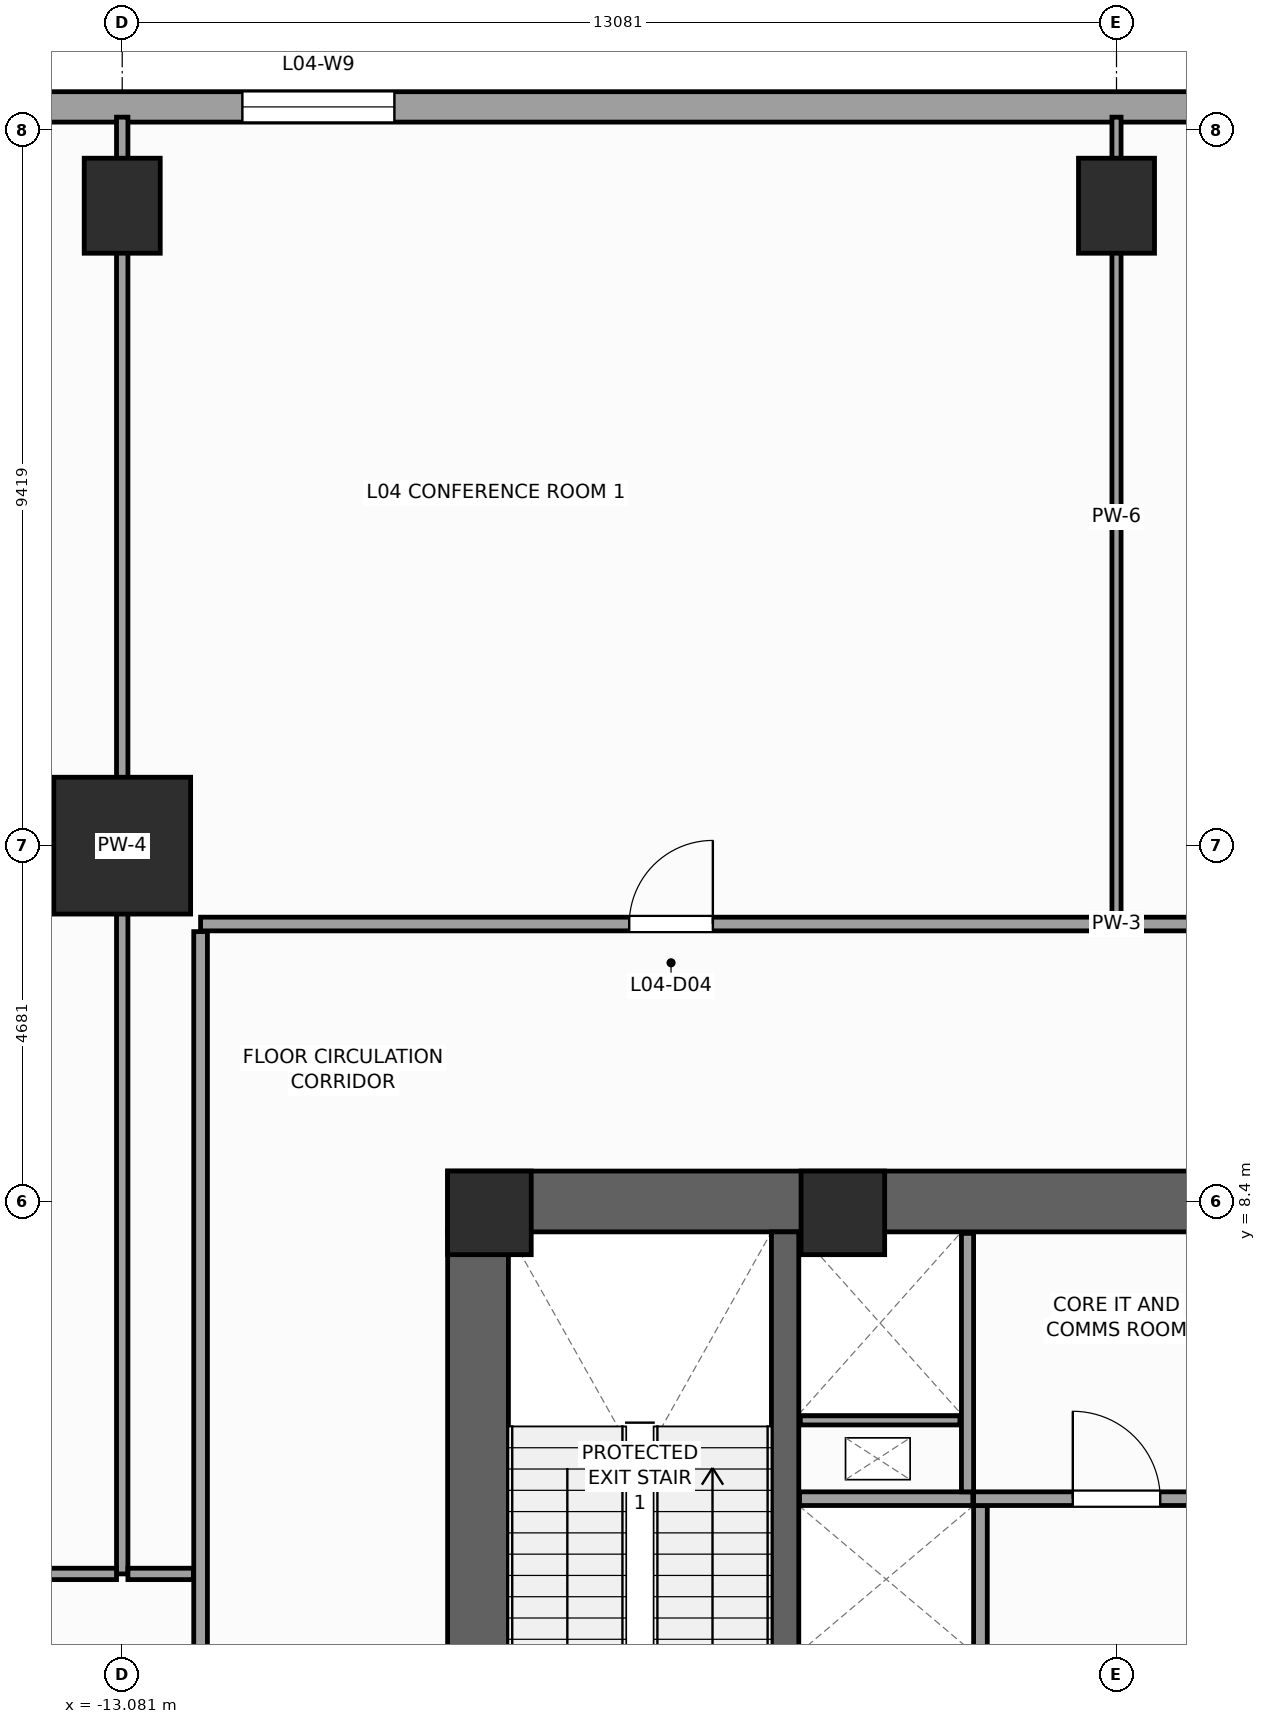
"""IFC4 building model, lengths in metres.
Left out: names, types, materials, properties, quantities, classifications, styles, units other than length and angle.
Written with IfcOpenShell. Run it as: python <this file> out.ifc"""

import sys

from ifc_helpers import new_model, si_unit, direction, frame, frame_2d, origin, origin_2d, place, context, subcontext, project, spatial, rectangle, extrude, source, transform, mapped, element, fill, save


model = new_model("IFC4")
c1 = context("Model", 3, precision=1e-05, world=origin(), true_north=direction((0.0, 1.0)))
c2 = subcontext(c1, "Body", "Model", "MODEL_VIEW")
j1 = project(units=[si_unit("LENGTHUNIT", "METRE"), si_unit("PLANEANGLEUNIT", "RADIAN")], contexts=[c1])
p1 = place(None, origin())
s1 = spatial("IfcSite", under=j1, at=p1, CompositionType="ELEMENT")
p2 = place(p1, origin())
s2 = spatial("IfcBuilding", under=s1, at=p2, CompositionType="ELEMENT")
p3 = place(p2, frame((0.0, 0.0, 21.0)))
s3 = spatial("IfcBuildingStorey", under=s2, at=p3, CompositionType="ELEMENT", Elevation=21.0)
p4 = place(p3, frame((-8.8, 8.4, 0.0), z_axis=(0.0, 0.0, 1.0), x_axis=(1.0, 0.0, 0.0)))
e1 = element("IfcWall", 1, at=p4, inside=s3, PredefinedType="SHEAR", context=c2, shape_type="SweptSolid", body=[
    extrude(rectangle(XDim=17.6, YDim=0.8, at=frame_2d((8.8, 0.0))), origin(), (0.0, 0.0, 1.0), 5.0),
])
p5 = place(p3, frame((-8.4, -8.0, 0.0), z_axis=(0.0, 0.0, 1.0), x_axis=(0.0, 1.0, 0.0)))
e2 = element("IfcWall", 2, at=p5, inside=s3, PredefinedType="SHEAR", context=c2, shape_type="SweptSolid", body=[
    extrude(rectangle(XDim=16.0, YDim=0.8, at=frame_2d((8.0, 0.0))), origin(), (0.0, 0.0, 1.0), 5.0),
])
p6 = place(p5, frame((4.69, 0.0, 0.0)))
e3 = element("IfcOpeningElement", 3, at=p6, cuts=e2, PredefinedType="OPENING", context=c2, shape_type="SweptSolid", body=[
    extrude(rectangle(XDim=1.3, YDim=2.2, at=frame_2d((0.65, 1.1))), frame((0.0, 0.41, 0.0), z_axis=(0.0, -1.0, 0.0), x_axis=(1.0, 0.0, 0.0)), (0.0, 0.0, 1.0), 0.82),
])
p7 = place(p3, frame((-4.36, -8.0, 0.0), z_axis=(0.0, 0.0, 1.0), x_axis=(0.0, 1.0, 0.0)))
e4 = element("IfcWall", 4, at=p7, inside=s3, PredefinedType="SHEAR", context=c2, shape_type="SweptSolid", body=[
    extrude(rectangle(XDim=16.0, YDim=0.36, at=frame_2d((8.0, 0.0))), origin(), (0.0, 0.0, 1.0), 5.0),
])
m1 = source(origin(), c2, "Body", "SweptSolid", [
    extrude(rectangle(XDim=1.1, YDim=1.1, at=origin_2d()), origin(), (0.0, 0.0, 1.0), 5.0),
])
for number, where, z_axis, x_axis in (
    (5, (-8.25, 8.25, 0.0), (0.0, 0.0, 1.0), (1.0, 0.0, 0.0)),
    (6, (-3.6, 8.25, 0.0), (0.0, 0.0, 1.0), (1.0, 0.0, 0.0)),
):
    element("IfcColumn", number, at=place(p3, frame(where, z_axis=z_axis, x_axis=x_axis)), inside=s3, PredefinedType="PILASTER", context=c2, shape_type="MappedRepresentation", body=[
        mapped(m1, transform((0.0, 0.0, 0.0), scale=1.0)),
    ])
m2 = source(origin(), c2, "Body", "SweptSolid", [
    extrude(rectangle(XDim=1.8, YDim=1.8, at=origin_2d()), origin(), (0.0, 0.0, 1.0), 5.0),
])
p8 = place(p3, frame((-13.081, 13.081, 0.0), z_axis=(0.0, 0.0, 1.0), x_axis=(1.0, 0.0, 0.0)))
e7 = element("IfcColumn", 7, at=p8, inside=s3, PredefinedType="COLUMN", context=c2, shape_type="MappedRepresentation", body=[
    mapped(m2, transform((0.0, 0.0, 0.0), scale=1.0)),
])
m3 = source(origin(), c2, "Body", "SweptSolid", [
    extrude(rectangle(XDim=1.0, YDim=1.25, at=origin_2d()), origin(), (0.0, 0.0, 1.0), 5.0),
])
for number, where, z_axis, x_axis in (
    (8, (-13.081, 21.5, 0.0), (0.0, 0.0, 1.0), (1.0, 0.0, 0.0)),
    (9, (0.0, 21.5, 0.0), (0.0, 0.0, 1.0), (1.0, 0.0, 0.0)),
):
    element("IfcColumn", number, at=place(p3, frame(where, z_axis=z_axis, x_axis=x_axis)), inside=s3, PredefinedType="COLUMN", context=c2, shape_type="MappedRepresentation", body=[
        mapped(m3, transform((0.0, 0.0, 0.0), scale=1.0)),
    ])
p9 = place(p3, frame((-31.0, 22.8, 0.0), z_axis=(0.0, 0.0, 1.0), x_axis=(1.0, 0.0, 0.0)))
e10 = element("IfcWall", 10, at=p9, inside=s3, PredefinedType="STANDARD", context=c2, shape_type="SweptSolid", body=[
    extrude(rectangle(XDim=32.5, YDim=0.4, at=frame_2d((16.25, 0.0))), origin(), (0.0, 0.0, 1.0), 4.72),
])
p10 = place(p9, frame((9.0, 0.0, 0.65)))
e11 = element("IfcOpeningElement", 11, at=p10, cuts=e10, PredefinedType="OPENING", context=c2, shape_type="SweptSolid", body=[
    extrude(rectangle(XDim=2.0, YDim=1.45, at=frame_2d((1.0, 0.725))), frame((0.0, 0.21, 0.0), z_axis=(0.0, -1.0, 0.0), x_axis=(1.0, 0.0, 0.0)), (0.0, 0.0, 1.0), 0.42),
])
p11 = place(p9, frame((14.0, 0.0, 0.65)))
e12 = element("IfcOpeningElement", 12, at=p11, cuts=e10, PredefinedType="OPENING", context=c2, shape_type="SweptSolid", body=[
    extrude(rectangle(XDim=2.0, YDim=1.45, at=frame_2d((1.0, 0.725))), frame((0.0, 0.21, 0.0), z_axis=(0.0, -1.0, 0.0), x_axis=(1.0, 0.0, 0.0)), (0.0, 0.0, 1.0), 0.42),
])
p12 = place(p9, frame((19.5, 0.0, 0.65)))
e13 = element("IfcOpeningElement", 13, at=p12, cuts=e10, PredefinedType="OPENING", context=c2, shape_type="SweptSolid", body=[
    extrude(rectangle(XDim=2.0, YDim=1.45, at=frame_2d((1.0, 0.725))), frame((0.0, 0.21, 0.0), z_axis=(0.0, -1.0, 0.0), x_axis=(1.0, 0.0, 0.0)), (0.0, 0.0, 1.0), 0.42),
])
p13 = place(p3, frame((-1.79, -7.98, 0.0), z_axis=(0.0, 0.0, 1.0), x_axis=(0.0, 1.0, 0.0)))
e14 = element("IfcWall", 14, at=p13, inside=s3, PredefinedType="PARTITIONING", context=c2, shape_type="SweptSolid", body=[
    extrude(rectangle(XDim=12.38, YDim=0.18, at=frame_2d((6.19, 0.0))), origin(), (0.0, 0.0, 1.0), 4.72),
])
p14 = place(p13, frame((0.4, 0.0, 0.0)))
e15 = element("IfcOpeningElement", 15, at=p14, cuts=e14, PredefinedType="OPENING", context=c2, shape_type="SweptSolid", body=[
    extrude(rectangle(XDim=1.1, YDim=2.2, at=frame_2d((0.55, 1.1))), frame((0.0, 0.1, 0.0), z_axis=(0.0, -1.0, 0.0), x_axis=(1.0, 0.0, 0.0)), (0.0, 0.0, 1.0), 0.2),
])
p15 = place(p13, frame((2.46, 0.0, 0.0)))
e16 = element("IfcOpeningElement", 16, at=p15, cuts=e14, PredefinedType="OPENING", context=c2, shape_type="SweptSolid", body=[
    extrude(rectangle(XDim=1.1, YDim=2.2, at=frame_2d((0.55, 1.1))), frame((0.0, 0.1, 0.0), z_axis=(0.0, -1.0, 0.0), x_axis=(1.0, 0.0, 0.0)), (0.0, 0.0, 1.0), 0.2),
])
p16 = place(p3, frame((-1.88, 4.49, 0.0), z_axis=(0.0, 0.0, 1.0), x_axis=(1.0, 0.0, 0.0)))
e17 = element("IfcWall", 17, at=p16, inside=s3, PredefinedType="PARTITIONING", context=c2, shape_type="SweptSolid", body=[
    extrude(rectangle(XDim=3.76, YDim=0.18, at=frame_2d((1.88, 0.0))), origin(), (0.0, 0.0, 1.0), 4.72),
])
p17 = place(p16, frame((1.305, 0.0, 0.0)))
e18 = element("IfcOpeningElement", 18, at=p17, cuts=e17, PredefinedType="OPENING", context=c2, shape_type="SweptSolid", body=[
    extrude(rectangle(XDim=1.15, YDim=2.25, at=frame_2d((0.575, 1.125))), frame((0.0, 0.1, 0.0), z_axis=(0.0, -1.0, 0.0), x_axis=(1.0, 0.0, 0.0)), (0.0, 0.0, 1.0), 0.2),
])
p18 = place(p3, frame((-4.17, 4.49, 0.0), z_axis=(0.0, 0.0, 1.0), x_axis=(1.0, 0.0, 0.0)))
e19 = element("IfcWall", 19, at=p18, inside=s3, PredefinedType="PARTITIONING", context=c2, shape_type="SweptSolid", body=[
    extrude(rectangle(XDim=2.28, YDim=0.18, at=frame_2d((1.14, 0.0))), origin(), (0.0, 0.0, 1.0), 4.72),
])
p19 = place(p3, frame((-1.96, 4.58, 0.0), z_axis=(0.0, 0.0, 1.0), x_axis=(0.0, 1.0, 0.0)))
e20 = element("IfcWall", 20, at=p19, inside=s3, PredefinedType="PARTITIONING", context=c2, shape_type="SweptSolid", body=[
    extrude(rectangle(XDim=3.4, YDim=0.16, at=frame_2d((1.7, 0.0))), origin(), (0.0, 0.0, 1.0), 4.72),
])
p20 = place(p3, frame((-4.16, 5.52, 0.0), z_axis=(0.0, 0.0, 1.0), x_axis=(1.0, 0.0, 0.0)))
e21 = element("IfcWall", 21, at=p20, inside=s3, PredefinedType="PARTITIONING", context=c2, shape_type="SweptSolid", body=[
    extrude(rectangle(XDim=2.1, YDim=0.12, at=frame_2d((1.05, 0.0))), origin(), (0.0, 0.0, 1.0), 4.72),
])
p21 = place(p3, frame((-12.05, 12.05, 0.0), z_axis=(0.0, 0.0, 1.0), x_axis=(1.0, 0.0, 0.0)))
e22 = element("IfcWall", 22, at=p21, inside=s3, PredefinedType="PARTITIONING", context=c2, shape_type="SweptSolid", body=[
    extrude(rectangle(XDim=24.1, YDim=0.18, at=frame_2d((12.05, 0.0))), origin(), (0.0, 0.0, 1.0), 4.72),
])
p22 = place(p21, frame((5.639, 0.0, 0.0)))
e23 = element("IfcOpeningElement", 23, at=p22, cuts=e22, PredefinedType="OPENING", context=c2, shape_type="SweptSolid", body=[
    extrude(rectangle(XDim=1.1, YDim=2.2, at=frame_2d((0.55, 1.1))), frame((0.0, 0.1, 0.0), z_axis=(0.0, -1.0, 0.0), x_axis=(1.0, 0.0, 0.0)), (0.0, 0.0, 1.0), 0.2),
])
p23 = place(p21, frame((17.361, 0.0, 0.0)))
e24 = element("IfcOpeningElement", 24, at=p23, cuts=e22, PredefinedType="OPENING", context=c2, shape_type="SweptSolid", body=[
    extrude(rectangle(XDim=1.1, YDim=2.2, at=frame_2d((0.55, 1.1))), frame((0.0, 0.1, 0.0), z_axis=(0.0, -1.0, 0.0), x_axis=(1.0, 0.0, 0.0)), (0.0, 0.0, 1.0), 0.2),
])
p24 = place(p3, frame((-12.05, -4.96, 0.0), z_axis=(0.0, 0.0, 1.0), x_axis=(0.0, 1.0, 0.0)))
e25 = element("IfcWall", 25, at=p24, inside=s3, PredefinedType="PARTITIONING", context=c2, shape_type="SweptSolid", body=[
    extrude(rectangle(XDim=16.91, YDim=0.18, at=frame_2d((8.455, 0.0))), origin(), (0.0, 0.0, 1.0), 4.72),
])
p25 = place(p24, frame((5.835, 0.0, 0.0)))
e26 = element("IfcOpeningElement", 26, at=p25, cuts=e25, PredefinedType="OPENING", context=c2, shape_type="SweptSolid", body=[
    extrude(rectangle(XDim=0.95, YDim=2.15, at=frame_2d((0.475, 1.075))), frame((0.0, 0.1, 0.0), z_axis=(0.0, -1.0, 0.0), x_axis=(1.0, 0.0, 0.0)), (0.0, 0.0, 1.0), 0.2),
])
p26 = place(p3, frame((-13.081, 3.5, 0.0), z_axis=(0.0, 0.0, 1.0), x_axis=(0.0, 1.0, 0.0)))
e27 = element("IfcWall", 27, at=p26, inside=s3, PredefinedType="PARTITIONING", context=c2, shape_type="SweptSolid", body=[
    extrude(rectangle(XDim=19.165, YDim=0.15, at=frame_2d((9.583, 0.0))), origin(), (0.0, 0.0, 1.0), 2.88),
])
p27 = place(p3, frame((0.0, 12.145, 0.0), z_axis=(0.0, 0.0, 1.0), x_axis=(0.0, 1.0, 0.0)))
e28 = element("IfcWall", 28, at=p27, inside=s3, PredefinedType="PARTITIONING", context=c2, shape_type="SweptSolid", body=[
    extrude(rectangle(XDim=10.52, YDim=0.12, at=frame_2d((5.26, 0.0))), origin(), (0.0, 0.0, 1.0), 2.75),
])
p28 = place(p3, frame((-18.96, 3.5, 0.0), z_axis=(0.0, 0.0, 1.0), x_axis=(1.0, 0.0, 0.0)))
e29 = element("IfcWall", 29, at=p28, inside=s3, PredefinedType="PARTITIONING", context=c2, shape_type="SweptSolid", body=[
    extrude(rectangle(XDim=5.804, YDim=0.15, at=frame_2d((2.902, 0.0))), origin(), (0.0, 0.0, 1.0), 4.72),
])
p29 = place(p3, frame((-13.006, 3.5, 0.0), z_axis=(0.0, 0.0, 1.0), x_axis=(1.0, 0.0, 0.0)))
e30 = element("IfcWall", 30, at=p29, inside=s3, PredefinedType="PARTITIONING", context=c2, shape_type="SweptSolid", body=[
    extrude(rectangle(XDim=0.861, YDim=0.15, at=frame_2d((0.431, 0.0))), origin(), (0.0, 0.0, 1.0), 4.72),
])
m4 = source(origin(), c2, "Body", "SweptSolid", [
    extrude(rectangle(XDim=2.0, YDim=1.45, at=frame_2d((1.0, 0.725))), frame((0.0, 0.03, 0.0), z_axis=(0.0, -1.0, 0.0), x_axis=(1.0, 0.0, 0.0)), (0.0, 0.0, 1.0), 0.06),
])
p30 = place(p12, origin())
e31 = element("IfcWindow", 31, at=p30, inside=s3, PartitioningType="SINGLE_PANEL", PredefinedType="WINDOW", context=c2, shape_type="MappedRepresentation", body=[
    mapped(m4, transform((0.0, 0.0, 0.0), scale=1.0)),
])
fill(e13, e31)
m5 = source(origin(), c2, "Body", "SweptSolid", [
    extrude(rectangle(XDim=1.15, YDim=2.25, at=frame_2d((0.575, 1.125))), frame((0.0, 0.025, 0.0), z_axis=(0.0, -1.0, 0.0), x_axis=(1.0, 0.0, 0.0)), (0.0, 0.0, 1.0), 0.05),
])
p31 = place(p17, origin())
e32 = element("IfcDoor", 32, at=p31, inside=s3, OperationType="SINGLE_SWING_LEFT", PredefinedType="DOOR", context=c2, shape_type="MappedRepresentation", body=[
    mapped(m5, transform((0.0, 0.0, 0.0), scale=1.0)),
])
fill(e18, e32)
m6 = source(origin(), c2, "Body", "SweptSolid", [
    extrude(rectangle(XDim=1.1, YDim=2.2, at=frame_2d((0.55, 1.1))), frame((0.0, 0.025, 0.0), z_axis=(0.0, -1.0, 0.0), x_axis=(1.0, 0.0, 0.0)), (0.0, 0.0, 1.0), 0.05),
])
p32 = place(p22, origin())
e33 = element("IfcDoor", 33, at=p32, inside=s3, OperationType="SINGLE_SWING_RIGHT", PredefinedType="DOOR", context=c2, shape_type="MappedRepresentation", body=[
    mapped(m6, transform((0.0, 0.0, 0.0), scale=1.0)),
])
fill(e23, e33)
save(model, sys.argv[1])
